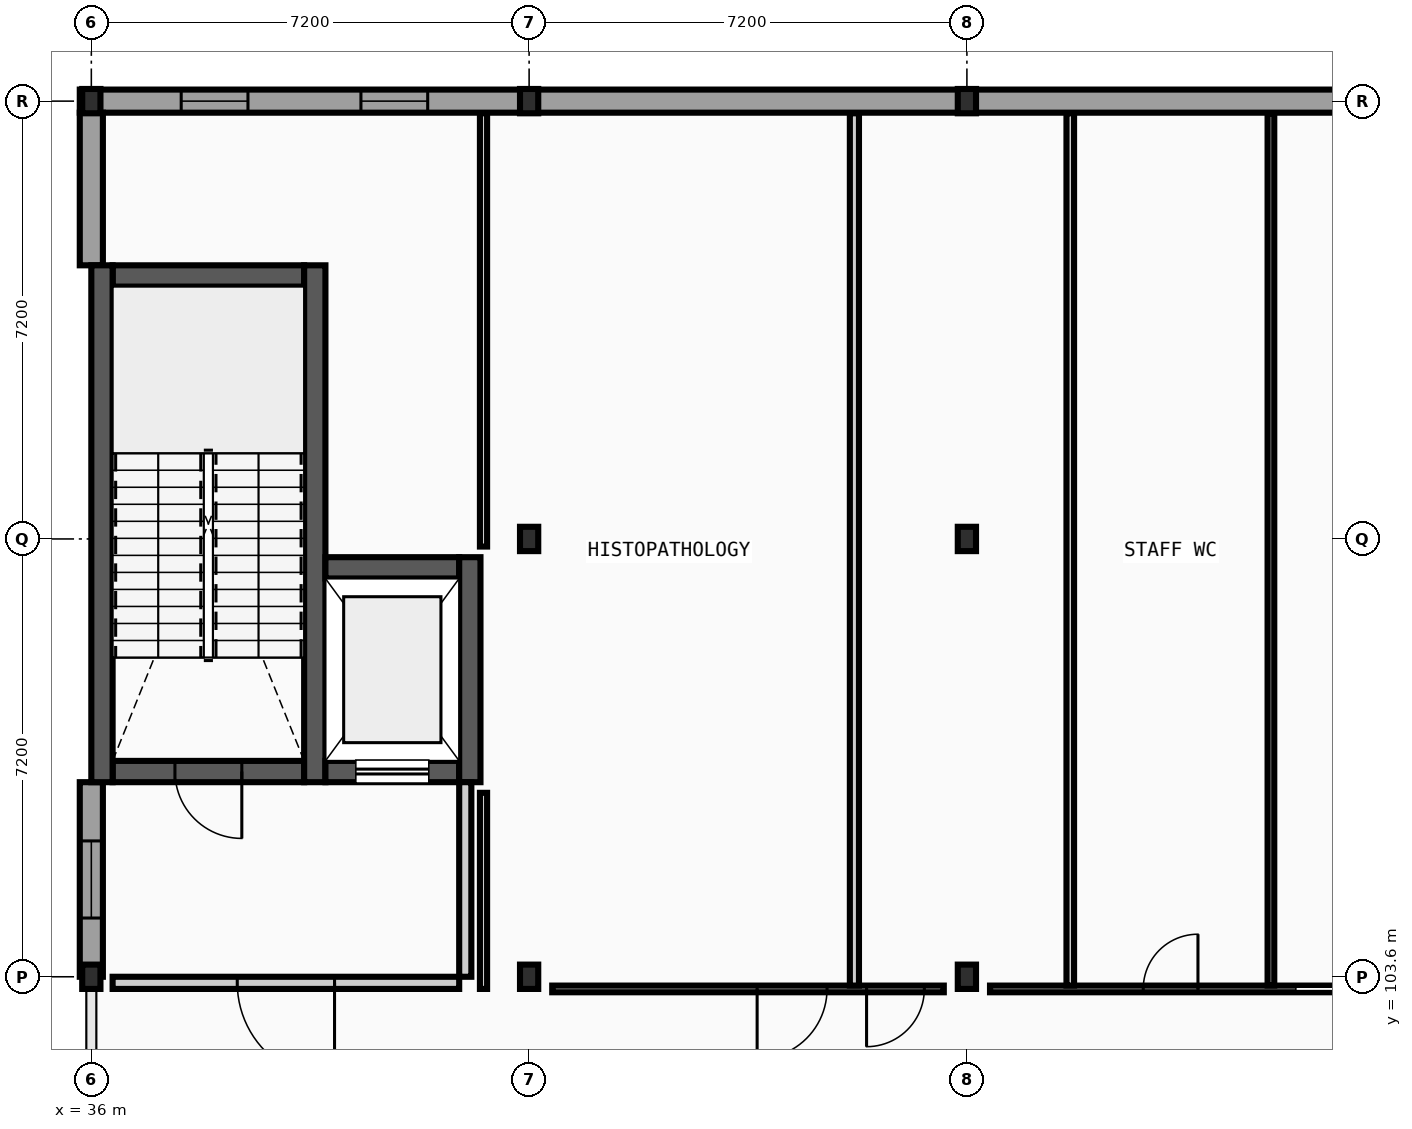
"""IFC4 building model, lengths in metres.
Left out: names, types, materials, properties, quantities, classifications, styles, units other than length and angle.
Written with IfcOpenShell. Run it as: python <this file> out.ifc"""

import sys

from ifc_helpers import new_model, si_unit, direction, frame, frame_2d, origin, origin_2d, place, context, subcontext, project, spatial, rectangle, i_section, extrude, element, fill, save


model = new_model("IFC4")
c1 = context("Model", 3, precision=1e-05, world=origin(), true_north=direction((0.0, 1.0)))
c2 = subcontext(c1, "Body", "Model", "MODEL_VIEW")
j1 = project(units=[si_unit("LENGTHUNIT", "METRE"), si_unit("PLANEANGLEUNIT", "RADIAN")], contexts=[c1])
p1 = place(None, origin())
s1 = spatial("IfcSite", under=j1, at=p1, CompositionType="ELEMENT")
p2 = place(p1, origin())
s2 = spatial("IfcBuilding", under=s1, at=p2, CompositionType="ELEMENT")
p3 = place(p2, frame((0.0, 0.0, 9.6)))
s3 = spatial("IfcBuildingStorey", under=s2, at=p3, CompositionType="ELEMENT", Elevation=9.6)
for number, where, z_axis, x_axis in (
    (1, (36.0, 103.6, 0.0), (0.0, 0.0, 1.0), (1.0, 0.0, 0.0)),
    (2, (36.0, 118.0, 0.0), (0.0, 0.0, 1.0), (1.0, 0.0, 0.0)),
    (3, (43.2, 103.6, 0.0), (0.0, 0.0, 1.0), (1.0, 0.0, 0.0)),
    (4, (43.2, 110.8, 0.0), (0.0, 0.0, 1.0), (1.0, 0.0, 0.0)),
    (5, (43.2, 118.0, 0.0), (0.0, 0.0, 1.0), (1.0, 0.0, 0.0)),
    (6, (50.4, 103.6, 0.0), (0.0, 0.0, 1.0), (1.0, 0.0, 0.0)),
    (7, (50.4, 110.8, 0.0), (0.0, 0.0, 1.0), (1.0, 0.0, 0.0)),
    (8, (50.4, 118.0, 0.0), (0.0, 0.0, 1.0), (1.0, 0.0, 0.0)),
):
    element("IfcColumn", number, at=place(p3, frame(where, z_axis=z_axis, x_axis=x_axis)), inside=s3, PredefinedType="COLUMN", context=c2, shape_type="SweptSolid", body=[
        extrude(i_section(OverallWidth=0.3, OverallDepth=0.4, WebThickness=0.013, FlangeThickness=0.024, FilletRadius=0.027, at=origin_2d()), origin(), (0.0, 0.0, 1.0), 4.4),
    ])
p4 = place(p3, frame((43.2, 118.0, 0.0), z_axis=(0.0, 0.0, 1.0), x_axis=(-1.0, 0.0, 0.0)))
e9 = element("IfcWall", 9, at=p4, inside=s3, PredefinedType="STANDARD", context=c2, shape_type="SweptSolid", body=[
    extrude(rectangle(XDim=7.39, YDim=0.38, at=frame_2d((3.695, 0.0))), origin(), (0.0, 0.0, 1.0), 3.895),
])
p5 = place(p4, frame((1.668, 0.0, 0.95)))
e10 = element("IfcOpeningElement", 10, at=p5, cuts=e9, PredefinedType="OPENING", context=c2, shape_type="SweptSolid", body=[
    extrude(rectangle(XDim=1.098, YDim=1.404, at=frame_2d((0.549, 0.702))), frame((0.0, 0.2, 0.0), z_axis=(0.0, -1.0, 0.0), x_axis=(1.0, 0.0, 0.0)), (0.0, 0.0, 1.0), 0.4),
])
p6 = place(p4, frame((4.624, 0.0, 0.95)))
e11 = element("IfcOpeningElement", 11, at=p6, cuts=e9, PredefinedType="OPENING", context=c2, shape_type="SweptSolid", body=[
    extrude(rectangle(XDim=1.098, YDim=1.404, at=frame_2d((0.549, 0.702))), frame((0.0, 0.2, 0.0), z_axis=(0.0, -1.0, 0.0), x_axis=(1.0, 0.0, 0.0)), (0.0, 0.0, 1.0), 0.4),
])
p7 = place(p3, frame((50.4, 118.0, 0.0), z_axis=(0.0, 0.0, 1.0), x_axis=(-1.0, 0.0, 0.0)))
e12 = element("IfcWall", 12, at=p7, inside=s3, PredefinedType="STANDARD", context=c2, shape_type="SweptSolid", body=[
    extrude(rectangle(XDim=7.2, YDim=0.38, at=frame_2d((3.6, 0.0))), origin(), (0.0, 0.0, 1.0), 3.895),
])
p8 = place(p3, frame((57.6, 118.0, 0.0), z_axis=(0.0, 0.0, 1.0), x_axis=(-1.0, 0.0, 0.0)))
e13 = element("IfcWall", 13, at=p8, inside=s3, PredefinedType="STANDARD", context=c2, shape_type="SweptSolid", body=[
    extrude(rectangle(XDim=7.2, YDim=0.38, at=frame_2d((3.6, 0.0))), origin(), (0.0, 0.0, 1.0), 3.895),
])
p9 = place(p3, frame((36.0, 106.8, 0.0), z_axis=(0.0, 0.0, 1.0), x_axis=(0.0, -1.0, 0.0)))
e14 = element("IfcWall", 14, at=p9, inside=s3, PredefinedType="STANDARD", context=c2, shape_type="SweptSolid", body=[
    extrude(rectangle(XDim=3.2, YDim=0.38, at=frame_2d((1.6, 0.0))), origin(), (0.0, 0.0, 1.0), 4.2),
])
p10 = place(p9, frame((0.966, 0.0, 0.95)))
e15 = element("IfcOpeningElement", 15, at=p10, cuts=e14, PredefinedType="OPENING", context=c2, shape_type="SweptSolid", body=[
    extrude(rectangle(XDim=1.268, YDim=1.404, at=frame_2d((0.634, 0.702))), frame((0.0, 0.2, 0.0), z_axis=(0.0, -1.0, 0.0), x_axis=(1.0, 0.0, 0.0)), (0.0, 0.0, 1.0), 0.4),
])
p11 = place(p3, frame((36.0, 117.81, 0.0), z_axis=(0.0, 0.0, 1.0), x_axis=(0.0, -1.0, 0.0)))
e16 = element("IfcWall", 16, at=p11, inside=s3, PredefinedType="STANDARD", context=c2, shape_type="SweptSolid", body=[
    extrude(rectangle(XDim=2.51, YDim=0.38, at=frame_2d((1.255, 0.0))), origin(), (0.0, 0.0, 1.0), 4.2),
])
p12 = place(p3, frame((36.35, 106.975, 0.0), z_axis=(0.0, 0.0, 1.0), x_axis=(1.0, 0.0, 0.0)))
e17 = element("IfcWall", 17, at=p12, inside=s3, PredefinedType="SHEAR", context=c2, shape_type="SweptSolid", body=[
    extrude(rectangle(XDim=3.15, YDim=0.35, at=frame_2d((1.575, 0.0))), origin(), (0.0, 0.0, 1.0), 4.2),
])
p13 = place(p12, frame((1.025, 0.0, 0.0)))
e18 = element("IfcOpeningElement", 18, at=p13, cuts=e17, PredefinedType="OPENING", context=c2, shape_type="SweptSolid", body=[
    extrude(rectangle(XDim=1.1, YDim=2.15, at=frame_2d((0.55, 1.075))), frame((0.0, 0.185, 0.0), z_axis=(0.0, -1.0, 0.0), x_axis=(1.0, 0.0, 0.0)), (0.0, 0.0, 1.0), 0.37),
])
p14 = place(p3, frame((36.35, 115.125, 0.0), z_axis=(0.0, 0.0, 1.0), x_axis=(1.0, 0.0, 0.0)))
e19 = element("IfcWall", 19, at=p14, inside=s3, PredefinedType="SHEAR", context=c2, shape_type="SweptSolid", body=[
    extrude(rectangle(XDim=3.15, YDim=0.35, at=frame_2d((1.575, 0.0))), origin(), (0.0, 0.0, 1.0), 4.2),
])
for number, where, z_axis, x_axis in (
    (20, (36.175, 106.8, 0.0), (0.0, 0.0, 1.0), (0.0, 1.0, 0.0)),
    (21, (39.675, 106.8, 0.0), (0.0, 0.0, 1.0), (0.0, 1.0, 0.0)),
):
    element("IfcWall", number, at=place(p3, frame(where, z_axis=z_axis, x_axis=x_axis)), inside=s3, PredefinedType="SHEAR", context=c2, shape_type="SweptSolid", body=[
        extrude(rectangle(XDim=8.5, YDim=0.35, at=frame_2d((4.25, 0.0))), origin(), (0.0, 0.0, 1.0), 4.2),
    ])
p15 = place(p3, frame((39.85, 106.975, 0.0), z_axis=(0.0, 0.0, 1.0), x_axis=(1.0, 0.0, 0.0)))
e22 = element("IfcWall", 22, at=p15, inside=s3, PredefinedType="SHEAR", context=c2, shape_type="SweptSolid", body=[
    extrude(rectangle(XDim=2.2, YDim=0.35, at=frame_2d((1.1, 0.0))), origin(), (0.0, 0.0, 1.0), 4.2),
])
p16 = place(p15, frame((0.5, 0.0, 0.0)))
e23 = element("IfcOpeningElement", 23, at=p16, cuts=e22, PredefinedType="OPENING", context=c2, shape_type="SweptSolid", body=[
    extrude(rectangle(XDim=1.2, YDim=2.2, at=frame_2d((0.6, 1.1))), frame((0.0, 0.185, 0.0), z_axis=(0.0, -1.0, 0.0), x_axis=(1.0, 0.0, 0.0)), (0.0, 0.0, 1.0), 0.37),
])
p17 = place(p3, frame((39.85, 110.325, 0.0), z_axis=(0.0, 0.0, 1.0), x_axis=(1.0, 0.0, 0.0)))
e24 = element("IfcWall", 24, at=p17, inside=s3, PredefinedType="SHEAR", context=c2, shape_type="SweptSolid", body=[
    extrude(rectangle(XDim=2.2, YDim=0.35, at=frame_2d((1.1, 0.0))), origin(), (0.0, 0.0, 1.0), 4.2),
])
p18 = place(p3, frame((42.225, 106.8, 0.0), z_axis=(0.0, 0.0, 1.0), x_axis=(0.0, 1.0, 0.0)))
e25 = element("IfcWall", 25, at=p18, inside=s3, PredefinedType="SHEAR", context=c2, shape_type="SweptSolid", body=[
    extrude(rectangle(XDim=3.7, YDim=0.35, at=frame_2d((1.85, 0.0))), origin(), (0.0, 0.0, 1.0), 4.2),
])
p19 = place(p3, frame((36.35, 103.5, 0.0), z_axis=(0.0, 0.0, 1.0), x_axis=(1.0, 0.0, 0.0)))
e26 = element("IfcWall", 26, at=p19, inside=s3, PredefinedType="PARTITIONING", context=c2, shape_type="SweptSolid", body=[
    extrude(rectangle(XDim=5.7, YDim=0.2, at=frame_2d((2.85, 0.0))), origin(), (0.0, 0.0, 1.0), 3.895),
])
p20 = place(p19, frame((2.05, 0.0, 0.0)))
e27 = element("IfcOpeningElement", 27, at=p20, cuts=e26, PredefinedType="OPENING", context=c2, shape_type="SweptSolid", body=[
    extrude(rectangle(XDim=1.6, YDim=2.2, at=frame_2d((0.8, 1.1))), frame((0.0, 0.11, 0.0), z_axis=(0.0, -1.0, 0.0), x_axis=(1.0, 0.0, 0.0)), (0.0, 0.0, 1.0), 0.22),
])
p21 = place(p3, frame((42.15, 103.6, 0.0), z_axis=(0.0, 0.0, 1.0), x_axis=(0.0, 1.0, 0.0)))
e28 = element("IfcWall", 28, at=p21, inside=s3, PredefinedType="PARTITIONING", context=c2, shape_type="SweptSolid", body=[
    extrude(rectangle(XDim=3.2, YDim=0.2, at=frame_2d((1.6, 0.0))), origin(), (0.0, 0.0, 1.0), 4.2),
])
p22 = place(p3, frame((43.58, 103.4, 0.0), z_axis=(0.0, 0.0, 1.0), x_axis=(1.0, 0.0, 0.0)))
e29 = element("IfcWall", 29, at=p22, inside=s3, PredefinedType="PARTITIONING", context=c2, shape_type="SweptSolid", body=[
    extrude(rectangle(XDim=6.44, YDim=0.11, at=frame_2d((3.22, 0.0))), origin(), (0.0, 0.0, 1.0), 3.895),
])
p23 = place(p22, frame((5.17, 0.0, 0.0)))
e30 = element("IfcOpeningElement", 30, at=p23, cuts=e29, PredefinedType="OPENING", context=c2, shape_type="SweptSolid", body=[
    extrude(rectangle(XDim=0.95, YDim=2.1, at=frame_2d((0.475, 1.05))), frame((0.0, 0.065, 0.0), z_axis=(0.0, -1.0, 0.0), x_axis=(1.0, 0.0, 0.0)), (0.0, 0.0, 1.0), 0.13),
])
p24 = place(p22, frame((3.37, 0.0, 0.0)))
e31 = element("IfcOpeningElement", 31, at=p24, cuts=e29, PredefinedType="OPENING", context=c2, shape_type="SweptSolid", body=[
    extrude(rectangle(XDim=1.15, YDim=2.15, at=frame_2d((0.575, 1.075))), frame((0.0, 0.065, 0.0), z_axis=(0.0, -1.0, 0.0), x_axis=(1.0, 0.0, 0.0)), (0.0, 0.0, 1.0), 0.13),
])
p25 = place(p3, frame((50.78, 103.4, 0.0), z_axis=(0.0, 0.0, 1.0), x_axis=(1.0, 0.0, 0.0)))
e32 = element("IfcWall", 32, at=p25, inside=s3, PredefinedType="PARTITIONING", context=c2, shape_type="SweptSolid", body=[
    extrude(rectangle(XDim=6.44, YDim=0.11, at=frame_2d((3.22, 0.0))), origin(), (0.0, 0.0, 1.0), 3.895),
])
p26 = place(p25, frame((5.03, 0.0, 0.0)))
e33 = element("IfcOpeningElement", 33, at=p26, cuts=e32, PredefinedType="OPENING", context=c2, shape_type="SweptSolid", body=[
    extrude(rectangle(XDim=1.0, YDim=2.1, at=frame_2d((0.5, 1.05))), frame((0.0, 0.065, 0.0), z_axis=(0.0, -1.0, 0.0), x_axis=(1.0, 0.0, 0.0)), (0.0, 0.0, 1.0), 0.13),
])
p27 = place(p25, frame((2.52, 0.0, 0.0)))
e34 = element("IfcOpeningElement", 34, at=p27, cuts=e32, PredefinedType="OPENING", context=c2, shape_type="SweptSolid", body=[
    extrude(rectangle(XDim=0.9, YDim=2.1, at=frame_2d((0.45, 1.05))), frame((0.0, 0.065, 0.0), z_axis=(0.0, -1.0, 0.0), x_axis=(1.0, 0.0, 0.0)), (0.0, 0.0, 1.0), 0.13),
])
p28 = place(p3, frame((42.45, 103.4, 0.0), z_axis=(0.0, 0.0, 1.0), x_axis=(0.0, 1.0, 0.0)))
e35 = element("IfcWall", 35, at=p28, inside=s3, PredefinedType="PARTITIONING", context=c2, shape_type="SweptSolid", body=[
    extrude(rectangle(XDim=3.225, YDim=0.118, at=frame_2d((1.613, 0.0))), origin(), (0.0, 0.0, 1.0), 4.2),
])
p29 = place(p3, frame((42.45, 110.675, 0.0), z_axis=(0.0, 0.0, 1.0), x_axis=(0.0, 1.0, 0.0)))
e36 = element("IfcWall", 36, at=p29, inside=s3, PredefinedType="PARTITIONING", context=c2, shape_type="SweptSolid", body=[
    extrude(rectangle(XDim=7.125, YDim=0.118, at=frame_2d((3.562, 0.0))), origin(), (0.0, 0.0, 1.0), 4.2),
])
p30 = place(p3, frame((48.55, 103.455, 0.0), z_axis=(0.0, 0.0, 1.0), x_axis=(0.0, 1.0, 0.0)))
e37 = element("IfcWall", 37, at=p30, inside=s3, PredefinedType="PARTITIONING", context=c2, shape_type="SweptSolid", body=[
    extrude(rectangle(XDim=14.345, YDim=0.15, at=frame_2d((7.172, 0.0))), origin(), (0.0, 0.0, 1.0), 4.2),
])
p31 = place(p3, frame((52.1, 103.455, 0.0), z_axis=(0.0, 0.0, 1.0), x_axis=(0.0, 1.0, 0.0)))
e38 = element("IfcWall", 38, at=p31, inside=s3, PredefinedType="PARTITIONING", context=c2, shape_type="SweptSolid", body=[
    extrude(rectangle(XDim=14.345, YDim=0.125, at=frame_2d((7.172, 0.0))), origin(), (0.0, 0.0, 1.0), 4.2),
])
p32 = place(p3, frame((55.4, 103.455, 0.0), z_axis=(0.0, 0.0, 1.0), x_axis=(0.0, 1.0, 0.0)))
e39 = element("IfcWall", 39, at=p32, inside=s3, PredefinedType="PARTITIONING", context=c2, shape_type="SweptSolid", body=[
    extrude(rectangle(XDim=14.345, YDim=0.11, at=frame_2d((7.172, 0.0))), origin(), (0.0, 0.0, 1.0), 3.915),
])
p33 = place(p5, origin())
e40 = element("IfcWindow", 40, at=p33, inside=s3, PartitioningType="SINGLE_PANEL", PredefinedType="WINDOW", context=c2, shape_type="SweptSolid", body=[
    extrude(rectangle(XDim=1.098, YDim=1.404, at=frame_2d((0.549, 0.702))), frame((0.0, 0.03, 0.0), z_axis=(0.0, -1.0, 0.0), x_axis=(1.0, 0.0, 0.0)), (0.0, 0.0, 1.0), 0.06),
])
fill(e10, e40)
p34 = place(p6, origin())
e41 = element("IfcWindow", 41, at=p34, inside=s3, PartitioningType="SINGLE_PANEL", PredefinedType="WINDOW", context=c2, shape_type="SweptSolid", body=[
    extrude(rectangle(XDim=1.098, YDim=1.404, at=frame_2d((0.549, 0.702))), frame((0.0, 0.03, 0.0), z_axis=(0.0, -1.0, 0.0), x_axis=(1.0, 0.0, 0.0)), (0.0, 0.0, 1.0), 0.06),
])
fill(e11, e41)
p35 = place(p10, origin())
e42 = element("IfcWindow", 42, at=p35, inside=s3, PartitioningType="SINGLE_PANEL", PredefinedType="WINDOW", context=c2, shape_type="SweptSolid", body=[
    extrude(rectangle(XDim=1.268, YDim=1.404, at=frame_2d((0.634, 0.702))), frame((0.0, 0.03, 0.0), z_axis=(0.0, -1.0, 0.0), x_axis=(1.0, 0.0, 0.0)), (0.0, 0.0, 1.0), 0.06),
])
fill(e15, e42)
p36 = place(p13, origin())
e43 = element("IfcDoor", 43, at=p36, inside=s3, OperationType="SINGLE_SWING_RIGHT", PredefinedType="DOOR", context=c2, shape_type="SweptSolid", body=[
    extrude(rectangle(XDim=1.1, YDim=2.15, at=frame_2d((0.55, 1.075))), frame((0.0, 0.025, 0.0), z_axis=(0.0, -1.0, 0.0), x_axis=(1.0, 0.0, 0.0)), (0.0, 0.0, 1.0), 0.05),
])
fill(e18, e43)
p37 = place(p16, origin())
e44 = element("IfcDoor", 44, at=p37, inside=s3, OperationType="SLIDING_TO_RIGHT", PredefinedType="DOOR", context=c2, shape_type="SweptSolid", body=[
    extrude(rectangle(XDim=1.2, YDim=2.2, at=frame_2d((0.6, 1.1))), frame((0.0, 0.025, 0.0), z_axis=(0.0, -1.0, 0.0), x_axis=(1.0, 0.0, 0.0)), (0.0, 0.0, 1.0), 0.05),
])
fill(e23, e44)
p38 = place(p20, origin())
e45 = element("IfcDoor", 45, at=p38, inside=s3, OperationType="DOUBLE_DOOR_SINGLE_SWING", PredefinedType="DOOR", context=c2, shape_type="SweptSolid", body=[
    extrude(rectangle(XDim=1.6, YDim=2.2, at=frame_2d((0.8, 1.1))), frame((0.0, 0.025, 0.0), z_axis=(0.0, -1.0, 0.0), x_axis=(1.0, 0.0, 0.0)), (0.0, 0.0, 1.0), 0.05),
])
fill(e27, e45)
p39 = place(p26, frame((1.0, 0.0, 0.0), z_axis=(0.0, 0.0, 1.0), x_axis=(-1.0, 0.0, 0.0)))
e46 = element("IfcDoor", 46, at=p39, inside=s3, OperationType="SLIDING_TO_LEFT", PredefinedType="DOOR", context=c2, shape_type="SweptSolid", body=[
    extrude(rectangle(XDim=1.0, YDim=2.1, at=frame_2d((0.5, 1.05))), frame((0.0, 0.025, 0.0), z_axis=(0.0, -1.0, 0.0), x_axis=(1.0, 0.0, 0.0)), (0.0, 0.0, 1.0), 0.05),
])
fill(e33, e46)
p40 = place(p27, frame((0.9, 0.0, 0.0), z_axis=(0.0, 0.0, 1.0), x_axis=(-1.0, 0.0, 0.0)))
e47 = element("IfcDoor", 47, at=p40, inside=s3, OperationType="SINGLE_SWING_RIGHT", PredefinedType="DOOR", context=c2, shape_type="SweptSolid", body=[
    extrude(rectangle(XDim=0.9, YDim=2.1, at=frame_2d((0.45, 1.05))), frame((0.0, 0.025, 0.0), z_axis=(0.0, -1.0, 0.0), x_axis=(1.0, 0.0, 0.0)), (0.0, 0.0, 1.0), 0.05),
])
fill(e34, e47)
p41 = place(p23, frame((0.95, 0.0, 0.0), z_axis=(0.0, 0.0, 1.0), x_axis=(-1.0, 0.0, 0.0)))
e48 = element("IfcDoor", 48, at=p41, inside=s3, OperationType="SINGLE_SWING_LEFT", PredefinedType="DOOR", context=c2, shape_type="SweptSolid", body=[
    extrude(rectangle(XDim=0.95, YDim=2.1, at=frame_2d((0.475, 1.05))), frame((0.0, 0.025, 0.0), z_axis=(0.0, -1.0, 0.0), x_axis=(1.0, 0.0, 0.0)), (0.0, 0.0, 1.0), 0.05),
])
fill(e30, e48)
p42 = place(p24, frame((1.15, 0.0, 0.0), z_axis=(0.0, 0.0, 1.0), x_axis=(-1.0, 0.0, 0.0)))
e49 = element("IfcDoor", 49, at=p42, inside=s3, OperationType="SINGLE_SWING_LEFT", PredefinedType="DOOR", context=c2, shape_type="SweptSolid", body=[
    extrude(rectangle(XDim=1.15, YDim=2.15, at=frame_2d((0.575, 1.075))), frame((0.0, 0.025, 0.0), z_axis=(0.0, -1.0, 0.0), x_axis=(1.0, 0.0, 0.0)), (0.0, 0.0, 1.0), 0.05),
])
fill(e31, e49)
save(model, sys.argv[1])
